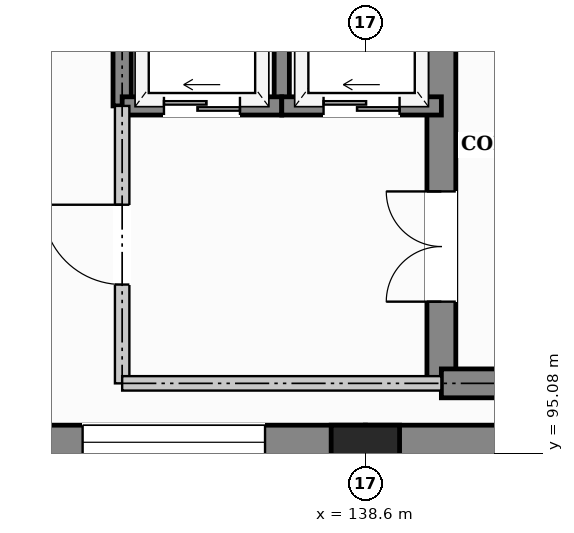
"""IFC4 building model, lengths in metres.
Left out: names, types, materials, properties, quantities, classifications, styles, units other than length and angle.
Written with IfcOpenShell. Run it as: python <this file> out.ifc"""

import sys

from ifc_helpers import new_model, si_unit, direction, frame, frame_2d, origin, origin_2d, place, context, subcontext, project, spatial, rectangle, extrude, element, fill, save


model = new_model("IFC4")
c1 = context("Model", 3, precision=1e-05, world=origin(), true_north=direction((0.0, 1.0)))
c2 = subcontext(c1, "Body", "Model", "MODEL_VIEW")
j1 = project(units=[si_unit("LENGTHUNIT", "METRE"), si_unit("PLANEANGLEUNIT", "RADIAN")], contexts=[c1])
p1 = place(None, origin())
s1 = spatial("IfcSite", under=j1, at=p1, CompositionType="ELEMENT")
p2 = place(p1, origin())
s2 = spatial("IfcBuilding", under=s1, at=p2, CompositionType="ELEMENT")
p3 = place(p2, origin())
s3 = spatial("IfcBuildingStorey", under=s2, at=p3, CompositionType="ELEMENT", Elevation=0.0)
p4 = place(p3, frame((138.6, 95.0, 0.0), z_axis=(0.0, 0.0, 1.0), x_axis=(1.0, 0.0, 0.0)))
e1 = element("IfcColumn", 1, at=p4, inside=s3, PredefinedType="COLUMN", context=c2, shape_type="SweptSolid", body=[
    extrude(rectangle(XDim=0.9, YDim=0.9, at=origin_2d()), origin(), (0.0, 0.0, 1.0), 5.1),
])
p5 = place(p3, frame((147.6, 95.225, 0.0), z_axis=(0.0, 0.0, 1.0), x_axis=(-1.0, 0.0, 0.0)))
e2 = element("IfcWall", 2, at=p5, inside=s3, PredefinedType="SOLIDWALL", context=c2, shape_type="SweptSolid", body=[
    extrude(rectangle(XDim=9.0, YDim=0.45, at=frame_2d((4.5, 0.0))), origin(), (0.0, 0.0, 1.0), 4.78),
])
p6 = place(p5, frame((3.3, 0.0, 0.0)))
e3 = element("IfcOpeningElement", 3, at=p6, cuts=e2, PredefinedType="OPENING", context=c2, shape_type="SweptSolid", body=[
    extrude(rectangle(XDim=2.4, YDim=2.7, at=frame_2d((1.2, 1.35))), frame((0.0, 0.235, 0.0), z_axis=(0.0, -1.0, 0.0), x_axis=(1.0, 0.0, 0.0)), (0.0, 0.0, 1.0), 0.47),
])
p7 = place(p3, frame((138.6, 95.225, 0.0), z_axis=(0.0, 0.0, 1.0), x_axis=(-1.0, 0.0, 0.0)))
e4 = element("IfcWall", 4, at=p7, inside=s3, PredefinedType="SOLIDWALL", context=c2, shape_type="SweptSolid", body=[
    extrude(rectangle(XDim=9.0, YDim=0.45, at=frame_2d((4.5, 0.0))), origin(), (0.0, 0.0, 1.0), 4.78),
])
p8 = place(p7, frame((1.32, 0.0, 0.85)))
e5 = element("IfcOpeningElement", 5, at=p8, cuts=e4, PredefinedType="OPENING", context=c2, shape_type="SweptSolid", body=[
    extrude(rectangle(XDim=2.4, YDim=2.8, at=frame_2d((1.2, 1.4))), frame((0.0, 0.235, 0.0), z_axis=(0.0, -1.0, 0.0), x_axis=(1.0, 0.0, 0.0)), (0.0, 0.0, 1.0), 0.47),
])
p9 = place(p7, frame((5.28, 0.0, 0.85)))
e6 = element("IfcOpeningElement", 6, at=p9, cuts=e4, PredefinedType="OPENING", context=c2, shape_type="SweptSolid", body=[
    extrude(rectangle(XDim=2.4, YDim=2.8, at=frame_2d((1.2, 1.4))), frame((0.0, 0.235, 0.0), z_axis=(0.0, -1.0, 0.0), x_axis=(1.0, 0.0, 0.0)), (0.0, 0.0, 1.0), 0.47),
])
p10 = place(p3, frame((139.6, 96.0, 0.0), z_axis=(0.0, 0.0, 1.0), x_axis=(0.0, 1.0, 0.0)))
e7 = element("IfcWall", 7, at=p10, inside=s3, PredefinedType="SHEAR", context=c2, shape_type="SweptSolid", body=[
    extrude(rectangle(XDim=6.0, YDim=0.38, at=frame_2d((3.0, 0.0))), origin(), (0.0, 0.0, 1.0), 4.78),
])
p11 = place(p10, frame((1.075, 0.0, 0.0)))
e8 = element("IfcOpeningElement", 8, at=p11, cuts=e7, PredefinedType="OPENING", context=c2, shape_type="SweptSolid", body=[
    extrude(rectangle(XDim=1.45, YDim=2.2, at=frame_2d((0.725, 1.1))), frame((0.0, 0.2, 0.0), z_axis=(0.0, -1.0, 0.0), x_axis=(1.0, 0.0, 0.0)), (0.0, 0.0, 1.0), 0.4),
])
p12 = place(p3, frame((139.6, 96.0, 0.0), z_axis=(0.0, 0.0, 1.0), x_axis=(1.0, 0.0, 0.0)))
e9 = element("IfcWall", 9, at=p12, inside=s3, PredefinedType="SHEAR", context=c2, shape_type="SweptSolid", body=[
    extrude(rectangle(XDim=7.0, YDim=0.38, at=frame_2d((3.5, 0.0))), origin(), (0.0, 0.0, 1.0), 4.78),
])
p13 = place(p3, frame((135.4, 99.65, 0.0), z_axis=(0.0, 0.0, 1.0), x_axis=(0.0, 1.0, 0.0)))
e10 = element("IfcWall", 10, at=p13, inside=s3, PredefinedType="SHEAR", context=c2, shape_type="SweptSolid", body=[
    extrude(rectangle(XDim=2.35, YDim=0.24, at=frame_2d((1.175, 0.0))), origin(), (0.0, 0.0, 1.0), 4.78),
])
p14 = place(p3, frame((137.5, 99.65, 0.0), z_axis=(0.0, 0.0, 1.0), x_axis=(0.0, 1.0, 0.0)))
e11 = element("IfcWall", 11, at=p14, inside=s3, PredefinedType="SHEAR", context=c2, shape_type="SweptSolid", body=[
    extrude(rectangle(XDim=2.35, YDim=0.2, at=frame_2d((1.175, 0.0))), origin(), (0.0, 0.0, 1.0), 4.78),
])
p15 = place(p3, frame((135.4, 99.65, 0.0), z_axis=(0.0, 0.0, 1.0), x_axis=(1.0, 0.0, 0.0)))
e12 = element("IfcWall", 12, at=p15, inside=s3, PredefinedType="SHEAR", context=c2, shape_type="SweptSolid", body=[
    extrude(rectangle(XDim=2.1, YDim=0.24, at=frame_2d((1.05, 0.0))), origin(), (0.0, 0.0, 1.0), 4.78),
])
p16 = place(p15, frame((0.55, 0.0, 0.0)))
e13 = element("IfcOpeningElement", 13, at=p16, cuts=e12, PredefinedType="OPENING", context=c2, shape_type="SweptSolid", body=[
    extrude(rectangle(XDim=1.0, YDim=2.1, at=frame_2d((0.5, 1.05))), frame((0.0, 0.13, 0.0), z_axis=(0.0, -1.0, 0.0), x_axis=(1.0, 0.0, 0.0)), (0.0, 0.0, 1.0), 0.26),
])
p17 = place(p3, frame((137.5, 99.65, 0.0), z_axis=(0.0, 0.0, 1.0), x_axis=(1.0, 0.0, 0.0)))
e14 = element("IfcWall", 14, at=p17, inside=s3, PredefinedType="SHEAR", context=c2, shape_type="SweptSolid", body=[
    extrude(rectangle(XDim=2.1, YDim=0.24, at=frame_2d((1.05, 0.0))), origin(), (0.0, 0.0, 1.0), 4.78),
])
p18 = place(p17, frame((0.55, 0.0, 0.0)))
e15 = element("IfcOpeningElement", 15, at=p18, cuts=e14, PredefinedType="OPENING", context=c2, shape_type="SweptSolid", body=[
    extrude(rectangle(XDim=1.0, YDim=2.1, at=frame_2d((0.5, 1.05))), frame((0.0, 0.13, 0.0), z_axis=(0.0, -1.0, 0.0), x_axis=(1.0, 0.0, 0.0)), (0.0, 0.0, 1.0), 0.26),
])
p19 = place(p3, frame((135.4, 96.0, 0.0), z_axis=(0.0, 0.0, 1.0), x_axis=(0.0, 1.0, 0.0)))
e16 = element("IfcWall", 16, at=p19, inside=s3, PredefinedType="PARTITIONING", context=c2, shape_type="SweptSolid", body=[
    extrude(rectangle(XDim=3.65, YDim=0.19, at=frame_2d((1.825, 0.0))), origin(), (0.0, 0.0, 1.0), 4.78),
])
p20 = place(p19, frame((1.3, 0.0, 0.0)))
e17 = element("IfcOpeningElement", 17, at=p20, cuts=e16, PredefinedType="OPENING", context=c2, shape_type="SweptSolid", body=[
    extrude(rectangle(XDim=1.05, YDim=2.15, at=frame_2d((0.525, 1.075))), frame((0.0, 0.105, 0.0), z_axis=(0.0, -1.0, 0.0), x_axis=(1.0, 0.0, 0.0)), (0.0, 0.0, 1.0), 0.21),
])
p21 = place(p3, frame((135.4, 96.0, 0.0), z_axis=(0.0, 0.0, 1.0), x_axis=(1.0, 0.0, 0.0)))
e18 = element("IfcWall", 18, at=p21, inside=s3, PredefinedType="PARTITIONING", context=c2, shape_type="SweptSolid", body=[
    extrude(rectangle(XDim=4.2, YDim=0.19, at=frame_2d((2.1, 0.0))), origin(), (0.0, 0.0, 1.0), 4.78),
])
p22 = place(p8, origin())
e19 = element("IfcWindow", 19, at=p22, inside=s3, PartitioningType="TRIPLE_PANEL_VERTICAL", PredefinedType="WINDOW", context=c2, shape_type="SweptSolid", body=[
    extrude(rectangle(XDim=2.4, YDim=2.8, at=frame_2d((1.2, 1.4))), frame((0.0, 0.03, 0.0), z_axis=(0.0, -1.0, 0.0), x_axis=(1.0, 0.0, 0.0)), (0.0, 0.0, 1.0), 0.06),
])
fill(e5, e19)
p23 = place(p11, origin())
e20 = element("IfcDoor", 20, at=p23, inside=s3, OperationType="DOUBLE_DOOR_SINGLE_SWING", PredefinedType="DOOR", context=c2, shape_type="SweptSolid", body=[
    extrude(rectangle(XDim=1.45, YDim=2.2, at=frame_2d((0.725, 1.1))), frame((0.0, 0.025, 0.0), z_axis=(0.0, -1.0, 0.0), x_axis=(1.0, 0.0, 0.0)), (0.0, 0.0, 1.0), 0.05),
])
fill(e8, e20)
p24 = place(p16, origin())
e21 = element("IfcDoor", 21, at=p24, inside=s3, OperationType="SLIDING_TO_LEFT", PredefinedType="DOOR", context=c2, shape_type="SweptSolid", body=[
    extrude(rectangle(XDim=1.0, YDim=2.1, at=frame_2d((0.5, 1.05))), frame((0.0, 0.025, 0.0), z_axis=(0.0, -1.0, 0.0), x_axis=(1.0, 0.0, 0.0)), (0.0, 0.0, 1.0), 0.05),
])
fill(e13, e21)
p25 = place(p18, origin())
e22 = element("IfcDoor", 22, at=p25, inside=s3, OperationType="SLIDING_TO_LEFT", PredefinedType="DOOR", context=c2, shape_type="SweptSolid", body=[
    extrude(rectangle(XDim=1.0, YDim=2.1, at=frame_2d((0.5, 1.05))), frame((0.0, 0.025, 0.0), z_axis=(0.0, -1.0, 0.0), x_axis=(1.0, 0.0, 0.0)), (0.0, 0.0, 1.0), 0.05),
])
fill(e15, e22)
p26 = place(p20, origin())
e23 = element("IfcDoor", 23, at=p26, inside=s3, OperationType="SINGLE_SWING_RIGHT", PredefinedType="DOOR", context=c2, shape_type="SweptSolid", body=[
    extrude(rectangle(XDim=1.05, YDim=2.15, at=frame_2d((0.525, 1.075))), frame((0.0, 0.025, 0.0), z_axis=(0.0, -1.0, 0.0), x_axis=(1.0, 0.0, 0.0)), (0.0, 0.0, 1.0), 0.05),
])
fill(e17, e23)
save(model, sys.argv[1])
